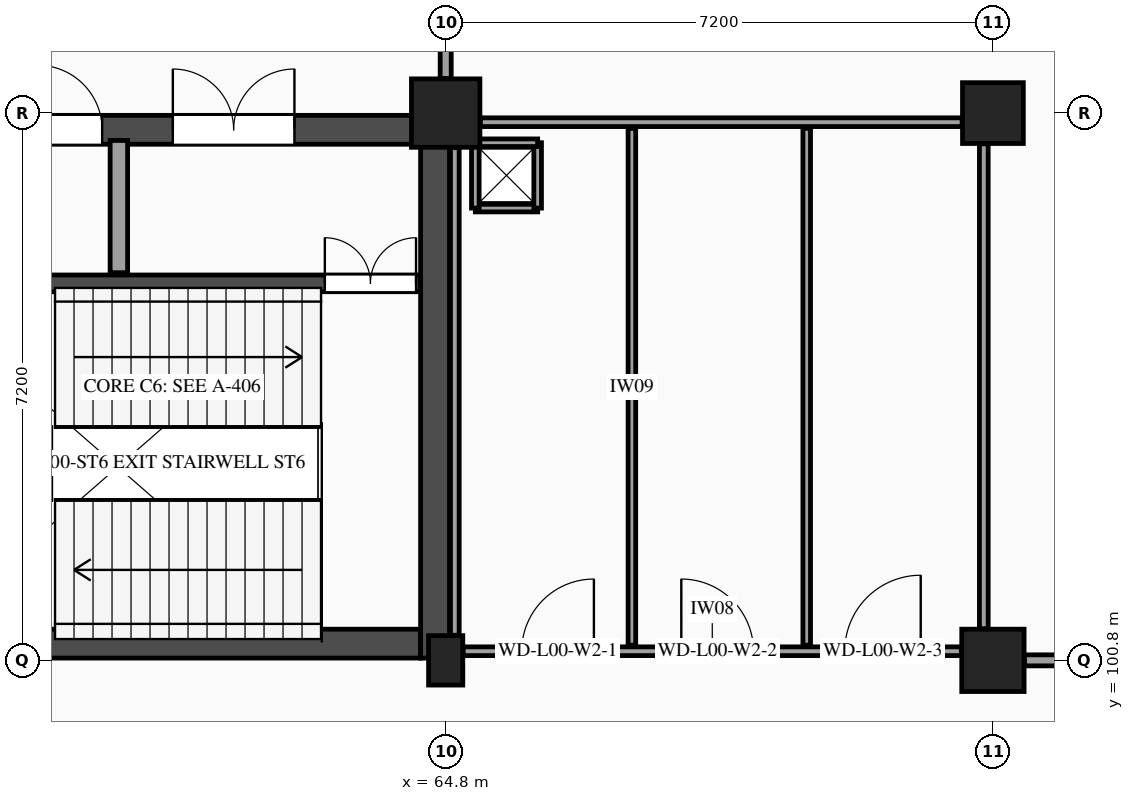
"""IFC4 building model, lengths in metres.
Left out: names, types, materials, properties, quantities, classifications, styles, units other than length and angle.
Written with IfcOpenShell. Run it as: python <this file> out.ifc"""

import sys

from ifc_helpers import new_model, si_unit, direction, frame, frame_2d, origin, origin_2d, place, context, subcontext, project, spatial, rectangle, extrude, element, fill, save


model = new_model("IFC4")
c1 = context("Model", 3, precision=1e-05, world=origin(), true_north=direction((0.0, 1.0)))
c2 = subcontext(c1, "Body", "Model", "MODEL_VIEW")
j1 = project(units=[si_unit("LENGTHUNIT", "METRE"), si_unit("PLANEANGLEUNIT", "RADIAN")], contexts=[c1])
p1 = place(None, origin())
s1 = spatial("IfcSite", under=j1, at=p1, CompositionType="ELEMENT")
p2 = place(p1, origin())
s2 = spatial("IfcBuilding", under=s1, at=p2, CompositionType="ELEMENT")
p3 = place(p2, origin())
s3 = spatial("IfcBuildingStorey", under=s2, at=p3, CompositionType="ELEMENT", Elevation=0.0)
p4 = place(p3, frame((64.8, 100.8, 0.0), z_axis=(0.0, 0.0, 1.0), x_axis=(1.0, 0.0, 0.0)))
e1 = element("IfcColumn", 1, at=p4, inside=s3, PredefinedType="PILASTER", context=c2, shape_type="SweptSolid", body=[
    extrude(rectangle(XDim=0.45, YDim=0.65, at=origin_2d()), origin(), (0.0, 0.0, 1.0), 5.4),
])
p5 = place(p3, frame((64.8, 108.0, 0.0), z_axis=(0.0, 0.0, 1.0), x_axis=(1.0, 0.0, 0.0)))
e2 = element("IfcColumn", 2, at=p5, inside=s3, PredefinedType="COLUMN", context=c2, shape_type="SweptSolid", body=[
    extrude(rectangle(XDim=0.9, YDim=0.9, at=origin_2d()), origin(), (0.0, 0.0, 1.0), 5.4),
])
p6 = place(p3, frame((72.0, 100.8, 0.0), z_axis=(0.0, 0.0, 1.0), x_axis=(1.0, 0.0, 0.0)))
e3 = element("IfcColumn", 3, at=p6, inside=s3, PredefinedType="COLUMN", context=c2, shape_type="SweptSolid", body=[
    extrude(rectangle(XDim=0.82, YDim=0.82, at=origin_2d()), origin(), (0.0, 0.0, 1.0), 5.4),
])
p7 = place(p3, frame((72.0, 108.0, 0.0), z_axis=(0.0, 0.0, 1.0), x_axis=(1.0, 0.0, 0.0)))
e4 = element("IfcColumn", 4, at=p7, inside=s3, PredefinedType="COLUMN", context=c2, shape_type="SweptSolid", body=[
    extrude(rectangle(XDim=0.8, YDim=0.8, at=origin_2d()), origin(), (0.0, 0.0, 1.0), 5.4),
])
p8 = place(p3, frame((58.01, 101.02, 0.0), z_axis=(0.0, 0.0, 1.0), x_axis=(1.0, 0.0, 0.0)))
e5 = element("IfcWall", 5, at=p8, inside=s3, PredefinedType="SHEAR", context=c2, shape_type="SweptSolid", body=[
    extrude(rectangle(XDim=6.46, YDim=0.38, at=frame_2d((3.23, 0.0))), origin(), (0.0, 0.0, 1.0), 5.09),
])
p9 = place(p3, frame((58.01, 107.78, 0.0), z_axis=(0.0, 0.0, 1.0), x_axis=(1.0, 0.0, 0.0)))
e6 = element("IfcWall", 6, at=p9, inside=s3, PredefinedType="SHEAR", context=c2, shape_type="SweptSolid", body=[
    extrude(rectangle(XDim=6.46, YDim=0.38, at=frame_2d((3.23, 0.0))), origin(), (0.0, 0.0, 1.0), 5.09),
])
p10 = place(p9, frame((1.42, 0.0, 0.0)))
e7 = element("IfcOpeningElement", 7, at=p10, cuts=e6, PredefinedType="OPENING", context=c2, shape_type="SweptSolid", body=[
    extrude(rectangle(XDim=0.85, YDim=2.1, at=frame_2d((0.425, 1.05))), frame((0.0, 0.2, 0.0), z_axis=(0.0, -1.0, 0.0), x_axis=(1.0, 0.0, 0.0)), (0.0, 0.0, 1.0), 0.4),
])
p11 = place(p9, frame((3.2, 0.0, 0.0)))
e8 = element("IfcOpeningElement", 8, at=p11, cuts=e6, PredefinedType="OPENING", context=c2, shape_type="SweptSolid", body=[
    extrude(rectangle(XDim=1.6, YDim=2.2, at=frame_2d((0.8, 1.1))), frame((0.0, 0.2, 0.0), z_axis=(0.0, -1.0, 0.0), x_axis=(1.0, 0.0, 0.0)), (0.0, 0.0, 1.0), 0.4),
])
p12 = place(p3, frame((58.01, 105.76, 0.0), z_axis=(0.0, 0.0, 1.0), x_axis=(1.0, 0.0, 0.0)))
e9 = element("IfcWall", 9, at=p12, inside=s3, PredefinedType="SHEAR", context=c2, shape_type="SweptSolid", body=[
    extrude(rectangle(XDim=6.46, YDim=0.22, at=frame_2d((3.23, 0.0))), origin(), (0.0, 0.0, 1.0), 5.09),
])
p13 = place(p12, frame((5.2, 0.0, 0.0)))
e10 = element("IfcOpeningElement", 10, at=p13, cuts=e9, PredefinedType="OPENING", context=c2, shape_type="SweptSolid", body=[
    extrude(rectangle(XDim=1.2, YDim=2.2, at=frame_2d((0.6, 1.1))), frame((0.0, 0.12, 0.0), z_axis=(0.0, -1.0, 0.0), x_axis=(1.0, 0.0, 0.0)), (0.0, 0.0, 1.0), 0.24),
])
p14 = place(p3, frame((60.5, 105.9, 0.0), z_axis=(0.0, 0.0, 1.0), x_axis=(0.0, 1.0, 0.0)))
e11 = element("IfcWall", 11, at=p14, inside=s3, PredefinedType="PARTITIONING", context=c2, shape_type="SweptSolid", body=[
    extrude(rectangle(XDim=1.74, YDim=0.23, at=frame_2d((0.87, 0.0))), origin(), (0.0, 0.0, 1.0), 5.09),
])
p15 = place(p3, frame((64.66, 100.83, 0.0), z_axis=(0.0, 0.0, 1.0), x_axis=(0.0, 1.0, 0.0)))
e12 = element("IfcWall", 12, at=p15, inside=s3, PredefinedType="SHEAR", context=c2, shape_type="SweptSolid", body=[
    extrude(rectangle(XDim=7.14, YDim=0.38, at=frame_2d((3.57, 0.0))), origin(), (0.0, 0.0, 1.0), 5.09),
])
p16 = place(p3, frame((65.03, 100.92, 0.0), z_axis=(0.0, 0.0, 1.0), x_axis=(1.0, 0.0, 0.0)))
e13 = element("IfcWall", 13, at=p16, inside=s3, PredefinedType="PARTITIONING", context=c2, shape_type="SweptSolid", body=[
    extrude(rectangle(XDim=6.555, YDim=0.115, at=frame_2d((3.277, 0.0))), origin(), (0.0, 0.0, 1.0), 4.29),
])
p17 = place(p16, frame((0.77, 0.0, 0.0)))
e14 = element("IfcOpeningElement", 14, at=p17, cuts=e13, PredefinedType="OPENING", context=c2, shape_type="SweptSolid", body=[
    extrude(rectangle(XDim=0.95, YDim=2.1, at=frame_2d((0.475, 1.05))), frame((0.0, 0.067, 0.0), z_axis=(0.0, -1.0, 0.0), x_axis=(1.0, 0.0, 0.0)), (0.0, 0.0, 1.0), 0.135),
])
p18 = place(p16, frame((2.87, 0.0, 0.0)))
e15 = element("IfcOpeningElement", 15, at=p18, cuts=e13, PredefinedType="OPENING", context=c2, shape_type="SweptSolid", body=[
    extrude(rectangle(XDim=0.95, YDim=2.1, at=frame_2d((0.475, 1.05))), frame((0.0, 0.067, 0.0), z_axis=(0.0, -1.0, 0.0), x_axis=(1.0, 0.0, 0.0)), (0.0, 0.0, 1.0), 0.135),
])
p19 = place(p16, frame((5.02, 0.0, 0.0)))
e16 = element("IfcOpeningElement", 16, at=p19, cuts=e13, PredefinedType="OPENING", context=c2, shape_type="SweptSolid", body=[
    extrude(rectangle(XDim=1.0, YDim=2.15, at=frame_2d((0.5, 1.075))), frame((0.0, 0.067, 0.0), z_axis=(0.0, -1.0, 0.0), x_axis=(1.0, 0.0, 0.0)), (0.0, 0.0, 1.0), 0.135),
])
p20 = place(p3, frame((65.255, 107.88, 0.0), z_axis=(0.0, 0.0, 1.0), x_axis=(1.0, 0.0, 0.0)))
e17 = element("IfcWall", 17, at=p20, inside=s3, PredefinedType="PARTITIONING", context=c2, shape_type="SweptSolid", body=[
    extrude(rectangle(XDim=6.34, YDim=0.115, at=frame_2d((3.17, 0.0))), origin(), (0.0, 0.0, 1.0), 4.29),
])
p21 = place(p3, frame((64.92, 101.13, 0.0), z_axis=(0.0, 0.0, 1.0), x_axis=(0.0, 1.0, 0.0)))
e18 = element("IfcWall", 18, at=p21, inside=s3, PredefinedType="PARTITIONING", context=c2, shape_type="SweptSolid", body=[
    extrude(rectangle(XDim=6.415, YDim=0.115, at=frame_2d((3.208, 0.0))), origin(), (0.0, 0.0, 1.0), 4.455),
])
p22 = place(p3, frame((71.88, 101.215, 0.0), z_axis=(0.0, 0.0, 1.0), x_axis=(0.0, 1.0, 0.0)))
e19 = element("IfcWall", 19, at=p22, inside=s3, PredefinedType="PARTITIONING", context=c2, shape_type="SweptSolid", body=[
    extrude(rectangle(XDim=6.38, YDim=0.115, at=frame_2d((3.19, 0.0))), origin(), (0.0, 0.0, 1.0), 4.455),
])
for number, where, z_axis, x_axis in (
    (20, (67.25, 101.0, 0.0), (0.0, 0.0, 1.0), (0.0, 1.0, 0.0)),
    (21, (69.55, 101.0, 0.0), (0.0, 0.0, 1.0), (0.0, 1.0, 0.0)),
):
    element("IfcWall", number, at=place(p3, frame(where, z_axis=z_axis, x_axis=x_axis)), inside=s3, PredefinedType="PARTITIONING", context=c2, shape_type="SweptSolid", body=[
        extrude(rectangle(XDim=6.8, YDim=0.1, at=frame_2d((3.4, 0.0))), origin(), (0.0, 0.0, 1.0), 5.09),
    ])
p23 = place(p3, frame((65.19, 106.75, 0.0), z_axis=(0.0, 0.0, 1.0), x_axis=(1.0, 0.0, 0.0)))
e22 = element("IfcWall", 22, at=p23, inside=s3, PredefinedType="PARTITIONING", context=c2, shape_type="SweptSolid", body=[
    extrude(rectangle(XDim=0.82, YDim=0.1, at=frame_2d((0.41, 0.0))), origin(), (0.0, 0.0, 1.0), 5.09),
])
p24 = place(p3, frame((66.01, 106.75, 0.0), z_axis=(0.0, 0.0, 1.0), x_axis=(0.0, 1.0, 0.0)))
e23 = element("IfcWall", 23, at=p24, inside=s3, PredefinedType="PARTITIONING", context=c2, shape_type="SweptSolid", body=[
    extrude(rectangle(XDim=0.86, YDim=0.1, at=frame_2d((0.43, 0.0))), origin(), (0.0, 0.0, 1.0), 5.09),
])
p25 = place(p3, frame((66.01, 107.61, 0.0), z_axis=(0.0, 0.0, 1.0), x_axis=(-1.0, 0.0, 0.0)))
e24 = element("IfcWall", 24, at=p25, inside=s3, PredefinedType="PARTITIONING", context=c2, shape_type="SweptSolid", body=[
    extrude(rectangle(XDim=0.82, YDim=0.1, at=frame_2d((0.41, 0.0))), origin(), (0.0, 0.0, 1.0), 5.09),
])
p26 = place(p3, frame((65.19, 107.61, 0.0), z_axis=(0.0, 0.0, 1.0), x_axis=(0.0, -1.0, 0.0)))
e25 = element("IfcWall", 25, at=p26, inside=s3, PredefinedType="PARTITIONING", context=c2, shape_type="SweptSolid", body=[
    extrude(rectangle(XDim=0.86, YDim=0.1, at=frame_2d((0.43, 0.0))), origin(), (0.0, 0.0, 1.0), 5.09),
])
p27 = place(p3, frame((64.8, 108.455, 0.0), z_axis=(0.0, 0.0, 1.0), x_axis=(0.0, 1.0, 0.0)))
e26 = element("IfcWall", 26, at=p27, inside=s3, PredefinedType="PARTITIONING", context=c2, shape_type="SweptSolid", body=[
    extrude(rectangle(XDim=6.3, YDim=0.145, at=frame_2d((3.15, 0.0))), origin(), (0.0, 0.0, 1.0), 4.405),
])
p28 = place(p27, frame((2.35, 0.0, 0.0)))
e27 = element("IfcOpeningElement", 27, at=p28, cuts=e26, PredefinedType="OPENING", context=c2, shape_type="SweptSolid", body=[
    extrude(rectangle(XDim=1.6, YDim=2.2, at=frame_2d((0.8, 1.1))), frame((0.0, 0.083, 0.0), z_axis=(0.0, -1.0, 0.0), x_axis=(1.0, 0.0, 0.0)), (0.0, 0.0, 1.0), 0.165),
])
p29 = place(p3, frame((72.415, 100.8, 0.0), z_axis=(0.0, 0.0, 1.0), x_axis=(1.0, 0.0, 0.0)))
e28 = element("IfcWall", 28, at=p29, inside=s3, PredefinedType="PARTITIONING", context=c2, shape_type="SweptSolid", body=[
    extrude(rectangle(XDim=6.555, YDim=0.145, at=frame_2d((3.277, 0.0))), origin(), (0.0, 0.0, 1.0), 4.31),
])
p30 = place(p10, origin())
e29 = element("IfcDoor", 29, at=p30, inside=s3, OperationType="SINGLE_SWING_LEFT", PredefinedType="DOOR", context=c2, shape_type="SweptSolid", body=[
    extrude(rectangle(XDim=0.85, YDim=2.1, at=frame_2d((0.425, 1.05))), frame((0.0, 0.025, 0.0), z_axis=(0.0, -1.0, 0.0), x_axis=(1.0, 0.0, 0.0)), (0.0, 0.0, 1.0), 0.05),
])
fill(e7, e29)
p31 = place(p13, frame((1.2, 0.0, 0.0), z_axis=(0.0, 0.0, 1.0), x_axis=(-1.0, 0.0, 0.0)))
e30 = element("IfcDoor", 30, at=p31, inside=s3, OperationType="DOUBLE_DOOR_SINGLE_SWING", PredefinedType="DOOR", context=c2, shape_type="SweptSolid", body=[
    extrude(rectangle(XDim=1.2, YDim=2.2, at=frame_2d((0.6, 1.1))), frame((0.0, 0.025, 0.0), z_axis=(0.0, -1.0, 0.0), x_axis=(1.0, 0.0, 0.0)), (0.0, 0.0, 1.0), 0.05),
])
fill(e10, e30)
p32 = place(p11, origin())
e31 = element("IfcDoor", 31, at=p32, inside=s3, OperationType="DOUBLE_DOOR_SINGLE_SWING", PredefinedType="DOOR", context=c2, shape_type="SweptSolid", body=[
    extrude(rectangle(XDim=1.6, YDim=2.2, at=frame_2d((0.8, 1.1))), frame((0.0, 0.025, 0.0), z_axis=(0.0, -1.0, 0.0), x_axis=(1.0, 0.0, 0.0)), (0.0, 0.0, 1.0), 0.05),
])
fill(e8, e31)
p33 = place(p17, origin())
e32 = element("IfcDoor", 32, at=p33, inside=s3, OperationType="SINGLE_SWING_RIGHT", PredefinedType="DOOR", context=c2, shape_type="SweptSolid", body=[
    extrude(rectangle(XDim=0.95, YDim=2.1, at=frame_2d((0.475, 1.05))), frame((0.0, 0.025, 0.0), z_axis=(0.0, -1.0, 0.0), x_axis=(1.0, 0.0, 0.0)), (0.0, 0.0, 1.0), 0.05),
])
fill(e14, e32)
p34 = place(p18, origin())
e33 = element("IfcDoor", 33, at=p34, inside=s3, OperationType="SINGLE_SWING_LEFT", PredefinedType="DOOR", context=c2, shape_type="SweptSolid", body=[
    extrude(rectangle(XDim=0.95, YDim=2.1, at=frame_2d((0.475, 1.05))), frame((0.0, 0.025, 0.0), z_axis=(0.0, -1.0, 0.0), x_axis=(1.0, 0.0, 0.0)), (0.0, 0.0, 1.0), 0.05),
])
fill(e15, e33)
p35 = place(p19, origin())
e34 = element("IfcDoor", 34, at=p35, inside=s3, OperationType="SINGLE_SWING_RIGHT", PredefinedType="DOOR", context=c2, shape_type="SweptSolid", body=[
    extrude(rectangle(XDim=1.0, YDim=2.15, at=frame_2d((0.5, 1.075))), frame((0.0, 0.025, 0.0), z_axis=(0.0, -1.0, 0.0), x_axis=(1.0, 0.0, 0.0)), (0.0, 0.0, 1.0), 0.05),
])
fill(e16, e34)
save(model, sys.argv[1])
